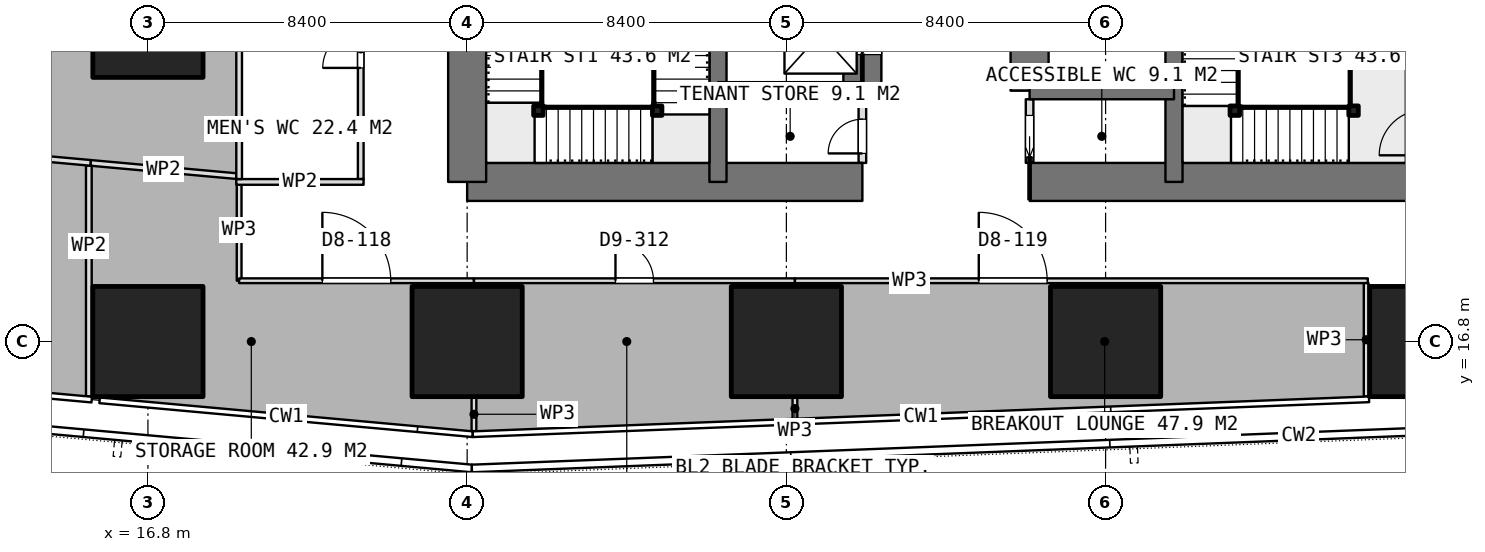
"""IFC4 building model, lengths in metres.
Left out: names, types, materials, properties, quantities, classifications, styles, units other than length and angle.
Written with IfcOpenShell. Run it as: python <this file> out.ifc"""

import sys

from ifc_helpers import new_model, si_unit, direction, frame, frame_2d, origin, origin_2d, place, context, subcontext, project, spatial, rectangle, extrude, element, fill, save


model = new_model("IFC4")
c1 = context("Model", 3, precision=1e-05, world=origin(), true_north=direction((0.0, 1.0)))
c2 = subcontext(c1, "Body", "Model", "MODEL_VIEW")
j1 = project(units=[si_unit("LENGTHUNIT", "METRE"), si_unit("PLANEANGLEUNIT", "RADIAN")], contexts=[c1])
p1 = place(None, origin())
s1 = spatial("IfcSite", under=j1, at=p1, CompositionType="ELEMENT")
p2 = place(p1, origin())
s2 = spatial("IfcBuilding", under=s1, at=p2, CompositionType="ELEMENT")
p3 = place(p2, frame((0.0, 0.0, 95.3)))
s3 = spatial("IfcBuildingStorey", under=s2, at=p3, CompositionType="ELEMENT", Elevation=95.3)
p4 = place(p3, frame((25.2, 21.0, 0.0), z_axis=(0.0, 0.0, 1.0), x_axis=(1.0, 0.0, 0.0)))
e1 = element("IfcWall", 1, at=p4, inside=s3, PredefinedType="SHEAR", context=c2, shape_type="SweptSolid", body=[
    extrude(rectangle(XDim=10.4, YDim=1.0, at=frame_2d((5.2, 0.0))), origin(), (0.0, 0.0, 1.0), 3.75),
])
p5 = place(p3, frame((40.0, 21.0, 0.0), z_axis=(0.0, 0.0, 1.0), x_axis=(1.0, 0.0, 0.0)))
e2 = element("IfcWall", 2, at=p5, inside=s3, PredefinedType="SHEAR", context=c2, shape_type="SweptSolid", body=[
    extrude(rectangle(XDim=10.4, YDim=1.0, at=frame_2d((5.2, 0.0))), origin(), (0.0, 0.0, 1.0), 3.75),
])
p6 = place(p3, frame((25.2, 21.0, 0.0), z_axis=(0.0, 0.0, 1.0), x_axis=(0.0, 1.0, 0.0)))
e3 = element("IfcWall", 3, at=p6, inside=s3, PredefinedType="SHEAR", context=c2, shape_type="SweptSolid", body=[
    extrude(rectangle(XDim=25.2, YDim=1.0, at=frame_2d((12.6, 0.0))), origin(), (0.0, 0.0, 1.0), 3.75),
])
p7 = place(p6, frame((7.8, 0.0, 0.0)))
e4 = element("IfcOpeningElement", 4, at=p7, cuts=e3, PredefinedType="OPENING", context=c2, shape_type="SweptSolid", body=[
    extrude(rectangle(XDim=1.2, YDim=2.1, at=frame_2d((0.6, 1.05))), frame((0.0, 0.51, 0.0), z_axis=(0.0, -1.0, 0.0), x_axis=(1.0, 0.0, 0.0)), (0.0, 0.0, 1.0), 1.02),
])
p8 = place(p6, frame((14.25, 0.0, 0.0)))
e5 = element("IfcOpeningElement", 5, at=p8, cuts=e3, PredefinedType="OPENING", context=c2, shape_type="SweptSolid", body=[
    extrude(rectangle(XDim=0.9, YDim=2.1, at=frame_2d((0.45, 1.05))), frame((0.0, 0.51, 0.0), z_axis=(0.0, -1.0, 0.0), x_axis=(1.0, 0.0, 0.0)), (0.0, 0.0, 1.0), 1.02),
])
p9 = place(p6, frame((16.85, 0.0, 0.0)))
e6 = element("IfcOpeningElement", 6, at=p9, cuts=e3, PredefinedType="OPENING", context=c2, shape_type="SweptSolid", body=[
    extrude(rectangle(XDim=0.9, YDim=2.1, at=frame_2d((0.45, 1.05))), frame((0.0, 0.51, 0.0), z_axis=(0.0, -1.0, 0.0), x_axis=(1.0, 0.0, 0.0)), (0.0, 0.0, 1.0), 1.02),
])
p10 = place(p6, frame((19.025, 0.0, 0.0)))
e7 = element("IfcOpeningElement", 7, at=p10, cuts=e3, PredefinedType="OPENING", context=c2, shape_type="SweptSolid", body=[
    extrude(rectangle(XDim=1.2, YDim=2.1, at=frame_2d((0.6, 1.05))), frame((0.0, 0.51, 0.0), z_axis=(0.0, -1.0, 0.0), x_axis=(1.0, 0.0, 0.0)), (0.0, 0.0, 1.0), 1.02),
])
for number, where, z_axis, x_axis in (
    (8, (31.8, 21.0, 0.0), (0.0, 0.0, 1.0), (0.0, 1.0, 0.0)),
    (9, (43.8, 21.0, 0.0), (0.0, 0.0, 1.0), (0.0, 1.0, 0.0)),
):
    element("IfcWall", number, at=place(p3, frame(where, z_axis=z_axis, x_axis=x_axis)), inside=s3, PredefinedType="SHEAR", context=c2, shape_type="SweptSolid", body=[
        extrude(rectangle(XDim=25.2, YDim=0.45, at=frame_2d((12.6, 0.0))), origin(), (0.0, 0.0, 1.0), 3.75),
    ])
p11 = place(p3, frame((35.6, 23.4, 0.0), z_axis=(0.0, 0.0, 1.0), x_axis=(0.0, 1.0, 0.0)))
e10 = element("IfcWall", 10, at=p11, inside=s3, PredefinedType="SHEAR", context=c2, shape_type="SweptSolid", body=[
    extrude(rectangle(XDim=18.0, YDim=1.0, at=frame_2d((9.0, 0.0))), origin(), (0.0, 0.0, 1.0), 3.75),
])
p12 = place(p11, frame((0.95, 0.0, 0.0)))
e11 = element("IfcOpeningElement", 11, at=p12, cuts=e10, PredefinedType="OPENING", context=c2, shape_type="SweptSolid", body=[
    extrude(rectangle(XDim=1.1, YDim=2.1, at=frame_2d((0.55, 1.05))), frame((0.0, 0.51, 0.0), z_axis=(0.0, -1.0, 0.0), x_axis=(1.0, 0.0, 0.0)), (0.0, 0.0, 1.0), 1.02),
])
p13 = place(p11, frame((3.95, 0.0, 0.0)))
e12 = element("IfcOpeningElement", 12, at=p13, cuts=e10, PredefinedType="OPENING", context=c2, shape_type="SweptSolid", body=[
    extrude(rectangle(XDim=1.1, YDim=2.1, at=frame_2d((0.55, 1.05))), frame((0.0, 0.51, 0.0), z_axis=(0.0, -1.0, 0.0), x_axis=(1.0, 0.0, 0.0)), (0.0, 0.0, 1.0), 1.02),
])
p14 = place(p11, frame((6.95, 0.0, 0.0)))
e13 = element("IfcOpeningElement", 13, at=p14, cuts=e10, PredefinedType="OPENING", context=c2, shape_type="SweptSolid", body=[
    extrude(rectangle(XDim=1.1, YDim=2.1, at=frame_2d((0.55, 1.05))), frame((0.0, 0.51, 0.0), z_axis=(0.0, -1.0, 0.0), x_axis=(1.0, 0.0, 0.0)), (0.0, 0.0, 1.0), 1.02),
])
p15 = place(p11, frame((9.95, 0.0, 0.0)))
e14 = element("IfcOpeningElement", 14, at=p15, cuts=e10, PredefinedType="OPENING", context=c2, shape_type="SweptSolid", body=[
    extrude(rectangle(XDim=1.1, YDim=2.1, at=frame_2d((0.55, 1.05))), frame((0.0, 0.51, 0.0), z_axis=(0.0, -1.0, 0.0), x_axis=(1.0, 0.0, 0.0)), (0.0, 0.0, 1.0), 1.02),
])
p16 = place(p11, frame((12.95, 0.0, 0.0)))
e15 = element("IfcOpeningElement", 15, at=p16, cuts=e10, PredefinedType="OPENING", context=c2, shape_type="SweptSolid", body=[
    extrude(rectangle(XDim=1.1, YDim=2.1, at=frame_2d((0.55, 1.05))), frame((0.0, 0.51, 0.0), z_axis=(0.0, -1.0, 0.0), x_axis=(1.0, 0.0, 0.0)), (0.0, 0.0, 1.0), 1.02),
])
p17 = place(p11, frame((15.95, 0.0, 0.0)))
e16 = element("IfcOpeningElement", 16, at=p17, cuts=e10, PredefinedType="OPENING", context=c2, shape_type="SweptSolid", body=[
    extrude(rectangle(XDim=1.1, YDim=2.1, at=frame_2d((0.55, 1.05))), frame((0.0, 0.51, 0.0), z_axis=(0.0, -1.0, 0.0), x_axis=(1.0, 0.0, 0.0)), (0.0, 0.0, 1.0), 1.02),
])
p18 = place(p3, frame((40.0, 23.4, 0.0), z_axis=(0.0, 0.0, 1.0), x_axis=(0.0, 1.0, 0.0)))
e17 = element("IfcWall", 17, at=p18, inside=s3, PredefinedType="SHEAR", context=c2, shape_type="SweptSolid", body=[
    extrude(rectangle(XDim=18.0, YDim=1.0, at=frame_2d((9.0, 0.0))), origin(), (0.0, 0.0, 1.0), 3.75),
])
for number, where, z_axis, x_axis in (
    (18, (31.8, 23.4, 0.0), (0.0, 0.0, 1.0), (1.0, 0.0, 0.0)),
    (19, (40.0, 23.4, 0.0), (0.0, 0.0, 1.0), (1.0, 0.0, 0.0)),
):
    element("IfcWall", number, at=place(p3, frame(where, z_axis=z_axis, x_axis=x_axis)), inside=s3, PredefinedType="SHEAR", context=c2, shape_type="SweptSolid", body=[
        extrude(rectangle(XDim=3.8, YDim=0.45, at=frame_2d((1.9, 0.0))), origin(), (0.0, 0.0, 1.0), 3.75),
    ])
for number, where, z_axis, x_axis in (
    (20, (16.8, 16.8, 0.0), (0.0, 0.0, 1.0), (1.0, 0.0, 0.0)),
    (21, (16.8, 25.2, 0.0), (0.0, 0.0, 1.0), (1.0, 0.0, 0.0)),
    (22, (25.2, 16.8, 0.0), (0.0, 0.0, 1.0), (1.0, 0.0, 0.0)),
    (23, (33.6, 16.8, 0.0), (0.0, 0.0, 1.0), (1.0, 0.0, 0.0)),
    (24, (42.0, 16.8, 0.0), (0.0, 0.0, 1.0), (1.0, 0.0, 0.0)),
    (25, (50.4, 16.8, 0.0), (0.0, 0.0, 1.0), (1.0, 0.0, 0.0)),
):
    element("IfcColumn", number, at=place(p3, frame(where, z_axis=z_axis, x_axis=x_axis)), inside=s3, PredefinedType="COLUMN", context=c2, shape_type="SweptSolid", body=[
        extrude(rectangle(XDim=2.9, YDim=2.9, at=origin_2d()), origin(), (0.0, 0.0, 1.0), 3.75),
    ])
p19 = place(p3, frame((40.0, 21.5, 0.0), z_axis=(0.0, 0.0, 1.0), x_axis=(0.0, 1.0, 0.0)))
e26 = element("IfcWall", 26, at=p19, inside=s3, PredefinedType="PARTITIONING", context=c2, shape_type="SweptSolid", body=[
    extrude(rectangle(XDim=1.675, YDim=0.2, at=frame_2d((0.837, 0.0))), origin(), (0.0, 0.0, 1.0), 3.5),
])
p20 = place(p19, frame((0.15, 0.0, 0.0)))
e27 = element("IfcOpeningElement", 27, at=p20, cuts=e26, PredefinedType="OPENING", context=c2, shape_type="SweptSolid", body=[
    extrude(rectangle(XDim=1.1, YDim=2.1, at=frame_2d((0.55, 1.05))), frame((0.0, 0.11, 0.0), z_axis=(0.0, -1.0, 0.0), x_axis=(1.0, 0.0, 0.0)), (0.0, 0.0, 1.0), 0.22),
])
p21 = place(p3, frame((35.6, 21.5, 0.0), z_axis=(0.0, 0.0, 1.0), x_axis=(0.0, 1.0, 0.0)))
e28 = element("IfcWall", 28, at=p21, inside=s3, PredefinedType="PARTITIONING", context=c2, shape_type="SweptSolid", body=[
    extrude(rectangle(XDim=1.675, YDim=0.2, at=frame_2d((0.837, 0.0))), origin(), (0.0, 0.0, 1.0), 3.5),
])
p22 = place(p21, frame((0.25, 0.0, 0.0)))
e29 = element("IfcOpeningElement", 29, at=p22, cuts=e28, PredefinedType="OPENING", context=c2, shape_type="SweptSolid", body=[
    extrude(rectangle(XDim=0.9, YDim=2.1, at=frame_2d((0.45, 1.05))), frame((0.0, 0.11, 0.0), z_axis=(0.0, -1.0, 0.0), x_axis=(1.0, 0.0, 0.0)), (0.0, 0.0, 1.0), 0.22),
])
p23 = place(p3, frame((19.125, 21.0, 0.0), z_axis=(0.0, 0.0, 1.0), x_axis=(1.0, 0.0, 0.0)))
e30 = element("IfcWall", 30, at=p23, inside=s3, PredefinedType="PARTITIONING", context=c2, shape_type="SweptSolid", body=[
    extrude(rectangle(XDim=3.35, YDim=0.15, at=frame_2d((1.675, 0.0))), origin(), (0.0, 0.0, 1.0), 3.5),
])
p24 = place(p3, frame((19.2, 21.075, 0.0), z_axis=(0.0, 0.0, 1.0), x_axis=(0.0, 1.0, 0.0)))
e31 = element("IfcWall", 31, at=p24, inside=s3, PredefinedType="PARTITIONING", context=c2, shape_type="SweptSolid", body=[
    extrude(rectangle(XDim=6.85, YDim=0.15, at=frame_2d((3.425, 0.0))), origin(), (0.0, 0.0, 1.0), 3.5),
])
p25 = place(p3, frame((22.4, 21.075, 0.0), z_axis=(0.0, 0.0, 1.0), x_axis=(0.0, 1.0, 0.0)))
e32 = element("IfcWall", 32, at=p25, inside=s3, PredefinedType="PARTITIONING", context=c2, shape_type="SweptSolid", body=[
    extrude(rectangle(XDim=6.85, YDim=0.15, at=frame_2d((3.425, 0.0))), origin(), (0.0, 0.0, 1.0), 3.5),
])
p26 = place(p25, frame((2.925, 0.0, 0.0)))
e33 = element("IfcOpeningElement", 33, at=p26, cuts=e32, PredefinedType="OPENING", context=c2, shape_type="SweptSolid", body=[
    extrude(rectangle(XDim=1.0, YDim=2.1, at=frame_2d((0.5, 1.05))), frame((0.0, 0.085, 0.0), z_axis=(0.0, -1.0, 0.0), x_axis=(1.0, 0.0, 0.0)), (0.0, 0.0, 1.0), 0.17),
])
p27 = place(p3, frame((19.125, 21.153, 0.0), z_axis=(0.0, 0.0, 1.0), x_axis=(-0.99591033818, 0.090347099052, 0.0)))
e34 = element("IfcWall", 34, at=p27, inside=s3, PredefinedType="PARTITIONING", context=c2, shape_type="SweptSolid", body=[
    extrude(rectangle(XDim=3.851, YDim=0.15, at=frame_2d((1.925, 0.0))), origin(), (0.0, 0.0, 1.0), 3.5),
])
p28 = place(p3, frame((15.245, 21.43, 0.0), z_axis=(0.0, 0.0, 1.0), x_axis=(0.0, -1.0, 0.0)))
e35 = element("IfcWall", 35, at=p28, inside=s3, PredefinedType="PARTITIONING", context=c2, shape_type="SweptSolid", body=[
    extrude(rectangle(XDim=6.07, YDim=0.15, at=frame_2d((3.035, 0.0))), origin(), (0.0, 0.0, 1.0), 3.5),
])
p29 = place(p3, frame((15.29, 21.501, 0.0), z_axis=(0.0, 0.0, 1.0), x_axis=(-0.995911351873, 0.090335924256, 0.0)))
e36 = element("IfcWall", 36, at=p29, inside=s3, PredefinedType="PARTITIONING", context=c2, shape_type="SweptSolid", body=[
    extrude(rectangle(XDim=2.313, YDim=0.15, at=frame_2d((1.157, 0.0))), origin(), (0.0, 0.0, 1.0), 3.5),
])
p30 = place(p3, frame((19.2, 21.074, 0.0), z_axis=(0.0, 0.0, 1.0), x_axis=(0.0, -1.0, 0.0)))
e37 = element("IfcWall", 37, at=p30, inside=s3, PredefinedType="PARTITIONING", context=c2, shape_type="SweptSolid", body=[
    extrude(rectangle(XDim=2.674, YDim=0.125, at=frame_2d((1.337, 0.0))), origin(), (0.0, 0.0, 1.0), 3.5),
])
p31 = place(p3, frame((19.2, 18.4, 0.0), z_axis=(0.0, 0.0, 1.0), x_axis=(1.0, 0.0, 0.0)))
e38 = element("IfcWall", 38, at=p31, inside=s3, PredefinedType="PARTITIONING", context=c2, shape_type="SweptSolid", body=[
    extrude(rectangle(XDim=6.179, YDim=0.125, at=frame_2d((3.089, 0.0))), origin(), (0.0, 0.0, 1.0), 3.5),
])
p32 = place(p31, frame((2.19, 0.0, 0.0)))
e39 = element("IfcOpeningElement", 39, at=p32, cuts=e38, PredefinedType="OPENING", context=c2, shape_type="SweptSolid", body=[
    extrude(rectangle(XDim=1.8, YDim=2.1, at=frame_2d((0.9, 1.05))), frame((0.0, 0.073, 0.0), z_axis=(0.0, -1.0, 0.0), x_axis=(1.0, 0.0, 0.0)), (0.0, 0.0, 1.0), 0.145),
])
p33 = place(p3, frame((25.379, 15.33, 0.0), z_axis=(0.0, 0.0, 1.0), x_axis=(0.0, -1.0, 0.0)))
e40 = element("IfcWall", 40, at=p33, inside=s3, PredefinedType="PARTITIONING", context=c2, shape_type="SweptSolid", body=[
    extrude(rectangle(XDim=0.887, YDim=0.125, at=frame_2d((0.443, 0.0))), origin(), (0.0, 0.0, 1.0), 3.5),
])
p34 = place(p3, frame((25.38, 18.4, 0.0), z_axis=(0.0, 0.0, 1.0), x_axis=(1.0, 0.0, 0.0)))
e41 = element("IfcWall", 41, at=p34, inside=s3, PredefinedType="PARTITIONING", context=c2, shape_type="SweptSolid", body=[
    extrude(rectangle(XDim=8.445, YDim=0.125, at=frame_2d((4.223, 0.0))), origin(), (0.0, 0.0, 1.0), 3.5),
])
p35 = place(p34, frame((3.723, 0.0, 0.0)))
e42 = element("IfcOpeningElement", 42, at=p35, cuts=e41, PredefinedType="OPENING", context=c2, shape_type="SweptSolid", body=[
    extrude(rectangle(XDim=1.0, YDim=2.1, at=frame_2d((0.5, 1.05))), frame((0.0, 0.073, 0.0), z_axis=(0.0, -1.0, 0.0), x_axis=(1.0, 0.0, 0.0)), (0.0, 0.0, 1.0), 0.145),
])
p36 = place(p3, frame((33.825, 15.33, 0.0), z_axis=(0.0, 0.0, 1.0), x_axis=(0.0, -1.0, 0.0)))
e43 = element("IfcWall", 43, at=p36, inside=s3, PredefinedType="PARTITIONING", context=c2, shape_type="SweptSolid", body=[
    extrude(rectangle(XDim=0.588, YDim=0.125, at=frame_2d((0.294, 0.0))), origin(), (0.0, 0.0, 1.0), 3.5),
])
p37 = place(p3, frame((33.826, 18.4, 0.0), z_axis=(0.0, 0.0, 1.0), x_axis=(1.0, 0.0, 0.0)))
e44 = element("IfcWall", 44, at=p37, inside=s3, PredefinedType="PARTITIONING", context=c2, shape_type="SweptSolid", body=[
    extrude(rectangle(XDim=15.074, YDim=0.125, at=frame_2d((7.537, 0.0))), origin(), (0.0, 0.0, 1.0), 3.5),
])
p38 = place(p37, frame((4.837, 0.0, 0.0)))
e45 = element("IfcOpeningElement", 45, at=p38, cuts=e44, PredefinedType="OPENING", context=c2, shape_type="SweptSolid", body=[
    extrude(rectangle(XDim=1.8, YDim=2.1, at=frame_2d((0.9, 1.05))), frame((0.0, 0.073, 0.0), z_axis=(0.0, -1.0, 0.0), x_axis=(1.0, 0.0, 0.0)), (0.0, 0.0, 1.0), 0.145),
])
p39 = place(p3, frame((48.857, 18.337, 0.0), z_axis=(0.0, 0.0, 1.0), x_axis=(0.0, -1.0, 0.0)))
e46 = element("IfcWall", 46, at=p39, inside=s3, PredefinedType="PARTITIONING", context=c2, shape_type="SweptSolid", body=[
    extrude(rectangle(XDim=2.98, YDim=0.125, at=frame_2d((1.49, 0.0))), origin(), (0.0, 0.0, 1.0), 3.5),
])
for number, where, z_axis, x_axis in (
    (47, (30.2, 22.875, 0.0), (0.0, 0.0, 1.0), (1.0, 0.0, 0.0)),
    (48, (27.075, 22.875, 0.0), (0.0, 0.0, 1.0), (1.0, 0.0, 0.0)),
    (49, (48.525, 22.875, 0.0), (0.0, 0.0, 1.0), (1.0, 0.0, 0.0)),
    (50, (45.4, 22.875, 0.0), (0.0, 0.0, 1.0), (1.0, 0.0, 0.0)),
):
    element("IfcColumn", number, at=place(p3, frame(where, z_axis=z_axis, x_axis=x_axis)), inside=s3, PredefinedType="COLUMN", context=c2, shape_type="SweptSolid", body=[
        extrude(rectangle(XDim=0.25, YDim=0.25, at=origin_2d()), origin(), (0.0, 0.0, 1.0), 3.75),
    ])
p40 = place(p20, origin())
e51 = element("IfcDoor", 51, at=p40, inside=s3, OperationType="SLIDING_TO_LEFT", PredefinedType="DOOR", context=c2, shape_type="SweptSolid", body=[
    extrude(rectangle(XDim=1.1, YDim=2.1, at=frame_2d((0.55, 1.05))), frame((0.0, 0.025, 0.0), z_axis=(0.0, -1.0, 0.0), x_axis=(1.0, 0.0, 0.0)), (0.0, 0.0, 1.0), 0.05),
])
fill(e27, e51)
p41 = place(p22, origin())
e52 = element("IfcDoor", 52, at=p41, inside=s3, OperationType="SINGLE_SWING_LEFT", PredefinedType="DOOR", context=c2, shape_type="SweptSolid", body=[
    extrude(rectangle(XDim=0.9, YDim=2.1, at=frame_2d((0.45, 1.05))), frame((0.0, 0.025, 0.0), z_axis=(0.0, -1.0, 0.0), x_axis=(1.0, 0.0, 0.0)), (0.0, 0.0, 1.0), 0.05),
])
fill(e29, e52)
p42 = place(p12, origin())
e53 = element("IfcDoor", 53, at=p42, inside=s3, OperationType="SLIDING_TO_LEFT", PredefinedType="USERDEFINED", context=c2, shape_type="SweptSolid", body=[
    extrude(rectangle(XDim=1.1, YDim=2.1, at=frame_2d((0.55, 1.05))), frame((0.0, 0.025, 0.0), z_axis=(0.0, -1.0, 0.0), x_axis=(1.0, 0.0, 0.0)), (0.0, 0.0, 1.0), 0.05),
])
fill(e11, e53)
p43 = place(p26, origin())
e54 = element("IfcDoor", 54, at=p43, inside=s3, OperationType="SINGLE_SWING_LEFT", PredefinedType="DOOR", context=c2, shape_type="SweptSolid", body=[
    extrude(rectangle(XDim=1.0, YDim=2.1, at=frame_2d((0.5, 1.05))), frame((0.0, 0.025, 0.0), z_axis=(0.0, -1.0, 0.0), x_axis=(1.0, 0.0, 0.0)), (0.0, 0.0, 1.0), 0.05),
])
fill(e33, e54)
p44 = place(p32, origin())
e55 = element("IfcDoor", 55, at=p44, inside=s3, OperationType="DOUBLE_DOOR_SINGLE_SWING", PredefinedType="DOOR", context=c2, shape_type="SweptSolid", body=[
    extrude(rectangle(XDim=1.8, YDim=2.1, at=frame_2d((0.9, 1.05))), frame((0.0, 0.025, 0.0), z_axis=(0.0, -1.0, 0.0), x_axis=(1.0, 0.0, 0.0)), (0.0, 0.0, 1.0), 0.05),
])
fill(e39, e55)
p45 = place(p35, origin())
e56 = element("IfcDoor", 56, at=p45, inside=s3, OperationType="SINGLE_SWING_LEFT", PredefinedType="DOOR", context=c2, shape_type="SweptSolid", body=[
    extrude(rectangle(XDim=1.0, YDim=2.1, at=frame_2d((0.5, 1.05))), frame((0.0, 0.025, 0.0), z_axis=(0.0, -1.0, 0.0), x_axis=(1.0, 0.0, 0.0)), (0.0, 0.0, 1.0), 0.05),
])
fill(e42, e56)
p46 = place(p38, origin())
e57 = element("IfcDoor", 57, at=p46, inside=s3, OperationType="DOUBLE_DOOR_SINGLE_SWING", PredefinedType="DOOR", context=c2, shape_type="SweptSolid", body=[
    extrude(rectangle(XDim=1.8, YDim=2.1, at=frame_2d((0.9, 1.05))), frame((0.0, 0.025, 0.0), z_axis=(0.0, -1.0, 0.0), x_axis=(1.0, 0.0, 0.0)), (0.0, 0.0, 1.0), 0.05),
])
fill(e45, e57)
save(model, sys.argv[1])
